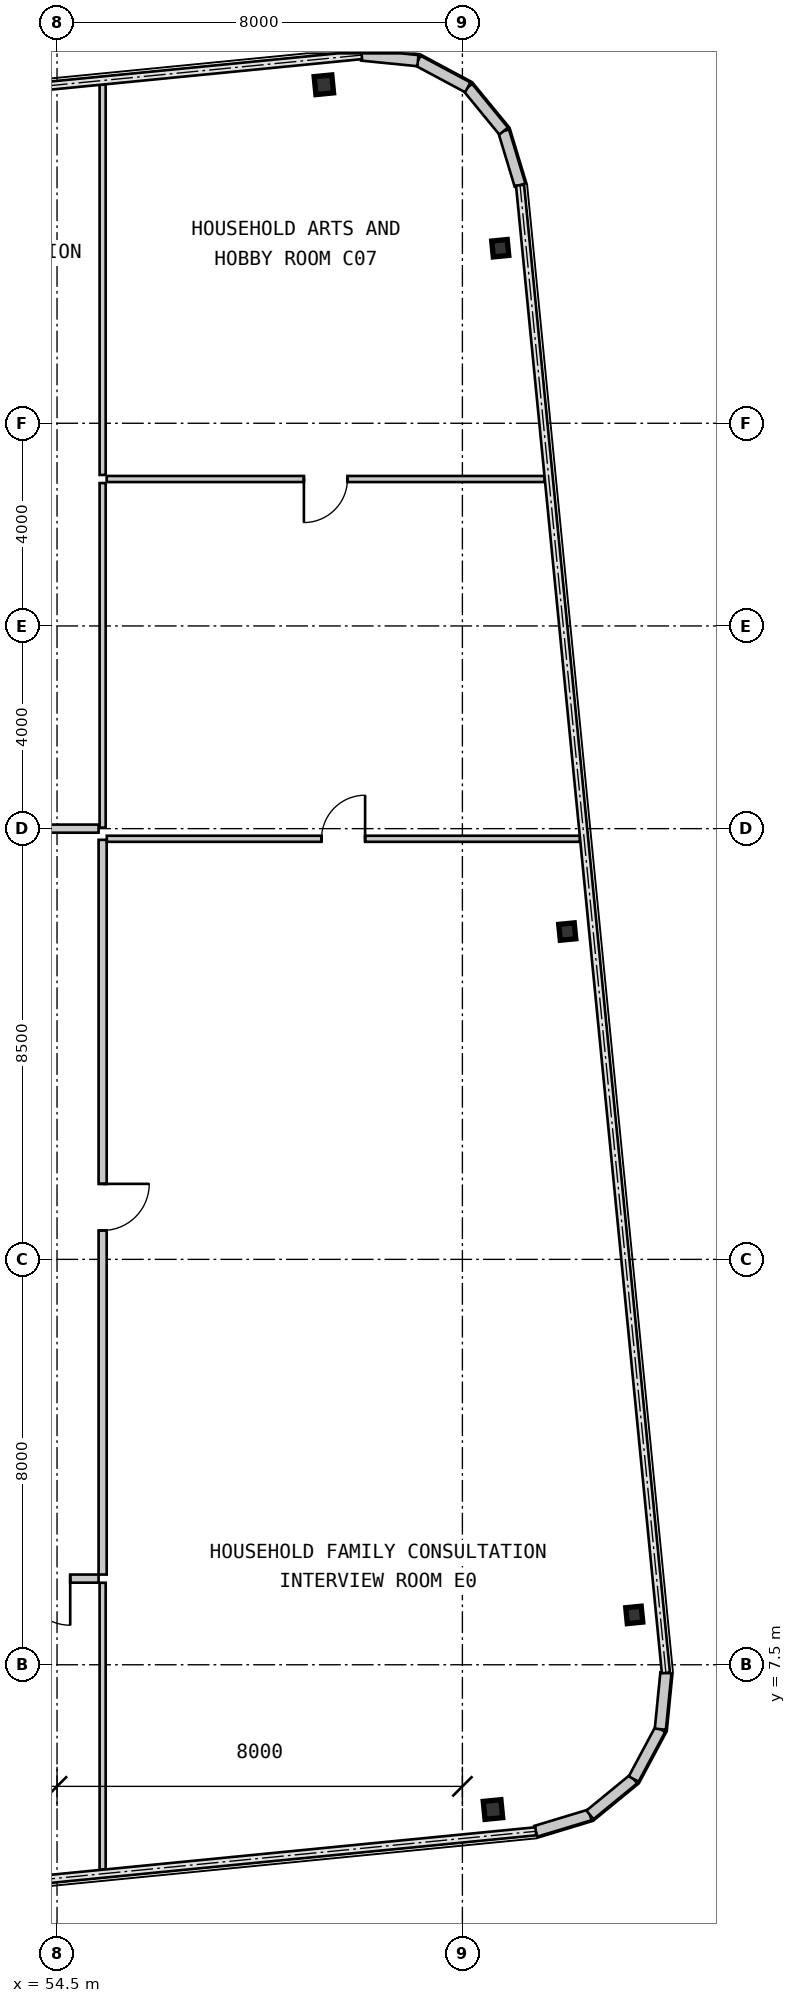
"""IFC4 building model, lengths in metres.
Left out: names, types, materials, properties, quantities, classifications, styles, units other than length and angle.
Written with IfcOpenShell. Run it as: python <this file> out.ifc"""

import sys

from ifc_helpers import new_model, si_unit, direction, frame, frame_2d, origin, origin_2d, place, context, subcontext, project, spatial, rectangle, i_section, extrude, source, transform, mapped, element, fill, save


model = new_model("IFC4")
c1 = context("Model", 3, precision=1e-05, world=origin(), true_north=direction((0.0, 1.0)))
c2 = subcontext(c1, "Body", "Model", "MODEL_VIEW")
j1 = project(units=[si_unit("LENGTHUNIT", "METRE"), si_unit("PLANEANGLEUNIT", "RADIAN")], contexts=[c1])
p1 = place(None, origin())
s1 = spatial("IfcSite", under=j1, at=p1, CompositionType="ELEMENT")
p2 = place(p1, origin())
s2 = spatial("IfcBuilding", under=s1, at=p2, CompositionType="ELEMENT")
p3 = place(p2, frame((0.0, 0.0, 106.05)))
s3 = spatial("IfcBuildingStorey", under=s2, at=p3, CompositionType="ELEMENT", Elevation=106.05)
m1 = source(origin(), c2, "Body", "SweptSolid", [
    extrude(i_section(OverallWidth=0.35, OverallDepth=0.356, WebThickness=0.018, FlangeThickness=0.028, at=origin_2d()), origin(), (0.0, 0.0, 1.0), 3.15),
])
for number, where, z_axis, x_axis in (
    (1, (63.103, 4.643, 0.0), (0.0, 0.0, 1.0), (0.995, 0.098, 0.0)),
    (2, (59.766, 38.68, 0.0), (0.0, 0.0, 1.0), (0.995, 0.098, 0.0)),
):
    element("IfcColumn", number, at=place(p3, frame(where, z_axis=z_axis, x_axis=x_axis)), inside=s3, PredefinedType="COLUMN", context=c2, shape_type="MappedRepresentation", body=[
        mapped(m1, transform((0.0, 0.0, 0.0), scale=1.0)),
    ])
m2 = source(origin(), c2, "Body", "SweptSolid", [
    extrude(i_section(OverallWidth=0.307, OverallDepth=0.315, WebThickness=0.012, FlangeThickness=0.019, at=origin_2d()), origin(), (0.0, 0.0, 1.0), 3.15),
])
for number, where, z_axis, x_axis in (
    (3, (65.892, 8.484, 0.0), (0.0, 0.0, 1.0), (0.995, 0.098, 0.0)),
    (4, (64.57, 21.969, 0.0), (0.0, 0.0, 1.0), (0.995, 0.098, 0.0)),
    (5, (63.247, 35.454, 0.0), (0.0, 0.0, 1.0), (0.995, 0.098, 0.0)),
):
    element("IfcColumn", number, at=place(p3, frame(where, z_axis=z_axis, x_axis=x_axis)), inside=s3, PredefinedType="COLUMN", context=c2, shape_type="MappedRepresentation", body=[
        mapped(m2, transform((0.0, 0.0, 0.0), scale=1.0)),
    ])
m3 = source(origin(), c2, "Body", "SweptSolid", [
    extrude(rectangle(XDim=1.116, YDim=0.22, at=frame_2d((0.558, 0.0))), origin(), (0.0, 0.0, 1.0), 2.93),
])
p4 = place(p3, frame((63.949, 4.214, 0.0), z_axis=(0.0, 0.0, 1.0), x_axis=(0.957052003726, 0.289916301997, 0.0)))
e6 = element("IfcWall", 6, at=p4, inside=s3, PredefinedType="SOLIDWALL", context=c2, shape_type="MappedRepresentation", body=[
    mapped(m3, transform((0.0, 0.0, 0.0), scale=1.0)),
])
m4 = source(origin(), c2, "Body", "SweptSolid", [
    extrude(rectangle(XDim=1.116, YDim=0.22, at=frame_2d((0.558, 0.0))), origin(), (0.0, 0.0, 1.0), 2.93),
])
p5 = place(p3, frame((65.017, 4.537, 0.0), z_axis=(0.0, 0.0, 1.0), x_axis=(0.773342870285, 0.633988016432, 0.0)))
e7 = element("IfcWall", 7, at=p5, inside=s3, PredefinedType="SOLIDWALL", context=c2, shape_type="MappedRepresentation", body=[
    mapped(m4, transform((0.0, 0.0, 0.0), scale=1.0)),
])
p6 = place(p3, frame((65.88, 5.245, 0.0), z_axis=(0.0, 0.0, 1.0), x_axis=(0.471723463201, 0.881746547635, 0.0)))
e8 = element("IfcWall", 8, at=p6, inside=s3, PredefinedType="SOLIDWALL", context=c2, shape_type="MappedRepresentation", body=[
    mapped(m3, transform((0.0, 0.0, 0.0), scale=1.0)),
])
for number, where, z_axis, x_axis in (
    (9, (66.406, 6.229, 0.0), (0.0, 0.0, 1.0), (0.098, 0.995, 0.0)),
    (10, (63.638, 36.698, 0.0), (0.0, 0.0, 1.0), (-0.29, 0.957, 0.0)),
):
    element("IfcWall", number, at=place(p3, frame(where, z_axis=z_axis, x_axis=x_axis)), inside=s3, PredefinedType="SOLIDWALL", context=c2, shape_type="MappedRepresentation", body=[
        mapped(m4, transform((0.0, 0.0, 0.0), scale=1.0)),
    ])
p7 = place(p3, frame((63.314, 37.766, 0.0), z_axis=(0.0, 0.0, 1.0), x_axis=(-0.634095287989, 0.773254916409, 0.0)))
e11 = element("IfcWall", 11, at=p7, inside=s3, PredefinedType="SOLIDWALL", context=c2, shape_type="MappedRepresentation", body=[
    mapped(m3, transform((0.0, 0.0, 0.0), scale=1.0)),
])
for number, where, z_axis, x_axis in (
    (12, (62.607, 38.629, 0.0), (0.0, 0.0, 1.0), (-0.882, 0.472, 0.0)),
    (13, (61.623, 39.156, 0.0), (0.0, 0.0, 1.0), (-0.995, 0.098, 0.0)),
):
    element("IfcWall", number, at=place(p3, frame(where, z_axis=z_axis, x_axis=x_axis)), inside=s3, PredefinedType="SOLIDWALL", context=c2, shape_type="MappedRepresentation", body=[
        mapped(m4, transform((0.0, 0.0, 0.0), scale=1.0)),
    ])
m5 = source(origin(), c2, "Body", "SweptSolid", [
    extrude(rectangle(XDim=2.04, YDim=0.16, at=frame_2d((1.02, 0.0))), origin(), (0.0, 0.0, 1.0), 2.93),
])
p8 = place(p3, frame((55.32, 9.2, 0.0), z_axis=(0.0, 0.0, 1.0), x_axis=(-1.0, 0.0, 0.0)))
e14 = element("IfcWall", 14, at=p8, inside=s3, PredefinedType="PARTITIONING", context=c2, shape_type="MappedRepresentation", body=[
    mapped(m5, transform((0.0, 0.0, 0.0), scale=1.0)),
])
m6 = source(origin(), c2, "Body", "SweptSolid", [
    extrude(rectangle(XDim=0.92, YDim=2.1, at=frame_2d((0.46, 1.05))), frame((0.0, 0.09, 0.0), z_axis=(0.0, -1.0, 0.0), x_axis=(1.0, 0.0, 0.0)), (0.0, 0.0, 1.0), 0.18),
])
p9 = place(p8, frame((0.56, 0.0, 0.0)))
e15 = element("IfcOpeningElement", 15, at=p9, cuts=e14, PredefinedType="OPENING", context=c2, shape_type="MappedRepresentation", body=[
    mapped(m6, transform((0.0, 0.0, 0.0), scale=1.0)),
])
m7 = source(origin(), c2, "Body", "SweptSolid", [
    extrude(rectangle(XDim=14.5, YDim=0.16, at=frame_2d((7.25, 0.0))), origin(), (0.0, 0.0, 1.0), 2.93),
])
p10 = place(p3, frame((55.4, 23.78, 0.0), z_axis=(0.0, 0.0, 1.0), x_axis=(0.0, -1.0, 0.0)))
e16 = element("IfcWall", 16, at=p10, inside=s3, PredefinedType="PARTITIONING", context=c2, shape_type="MappedRepresentation", body=[
    mapped(m7, transform((0.0, 0.0, 0.0), scale=1.0)),
])
p11 = place(p10, frame((6.79, 0.0, 0.0)))
e17 = element("IfcOpeningElement", 17, at=p11, cuts=e16, PredefinedType="OPENING", context=c2, shape_type="MappedRepresentation", body=[
    mapped(m6, transform((0.0, 0.0, 0.0), scale=1.0)),
])
m8 = source(origin(), c2, "Body", "SweptSolid", [
    extrude(rectangle(XDim=3.016, YDim=0.16, at=frame_2d((1.508, 0.0))), origin(), (0.0, 0.0, 1.0), 2.93),
])
p12 = place(p3, frame((52.304, 24.0, 0.0), z_axis=(0.0, 0.0, 1.0), x_axis=(1.0, 0.0, 0.0)))
e18 = element("IfcWall", 18, at=p12, inside=s3, PredefinedType="PARTITIONING", context=c2, shape_type="MappedRepresentation", body=[
    mapped(m8, transform((0.0, 0.0, 0.0), scale=1.0)),
])
m9 = source(origin(), c2, "Body", "SweptSolid", [
    extrude(rectangle(XDim=5.658, YDim=0.12, at=frame_2d((2.829, 0.0))), origin(), (0.0, 0.0, 1.0), 2.93),
])
p13 = place(p3, frame((55.4, 9.118, 0.0), z_axis=(0.0, 0.0, 1.0), x_axis=(0.0, -1.0, 0.0)))
e19 = element("IfcWall", 19, at=p13, inside=s3, PredefinedType="PARTITIONING", context=c2, shape_type="MappedRepresentation", body=[
    mapped(m9, transform((0.0, 0.0, 0.0), scale=1.0)),
])
m10 = source(origin(), c2, "Body", "SweptSolid", [
    extrude(rectangle(XDim=9.336, YDim=0.12, at=frame_2d((4.668, 0.0))), origin(), (0.0, 0.0, 1.0), 2.93),
])
p14 = place(p3, frame((55.482, 23.8, 0.0), z_axis=(0.0, 0.0, 1.0), x_axis=(1.0, 0.0, 0.0)))
e20 = element("IfcWall", 20, at=p14, inside=s3, PredefinedType="PARTITIONING", context=c2, shape_type="MappedRepresentation", body=[
    mapped(m10, transform((0.0, 0.0, 0.0), scale=1.0)),
])
m11 = source(origin(), c2, "Body", "SweptSolid", [
    extrude(rectangle(XDim=0.86, YDim=2.1, at=frame_2d((0.43, 1.05))), frame((0.0, 0.07, 0.0), z_axis=(0.0, -1.0, 0.0), x_axis=(1.0, 0.0, 0.0)), (0.0, 0.0, 1.0), 0.14),
])
p15 = place(p14, frame((4.238, 0.0, 0.0)))
e21 = element("IfcOpeningElement", 21, at=p15, cuts=e20, PredefinedType="OPENING", context=c2, shape_type="MappedRepresentation", body=[
    mapped(m11, transform((0.0, 0.0, 0.0), scale=1.0)),
])
m12 = source(origin(), c2, "Body", "SweptSolid", [
    extrude(rectangle(XDim=8.644, YDim=0.12, at=frame_2d((4.322, 0.0))), origin(), (0.0, 0.0, 1.0), 2.93),
])
p16 = place(p3, frame((55.48, 30.9, 0.0), z_axis=(0.0, 0.0, 1.0), x_axis=(1.0, 0.0, 0.0)))
e22 = element("IfcWall", 22, at=p16, inside=s3, PredefinedType="PARTITIONING", context=c2, shape_type="MappedRepresentation", body=[
    mapped(m12, transform((0.0, 0.0, 0.0), scale=1.0)),
])
p17 = place(p16, frame((3.892, 0.0, 0.0)))
e23 = element("IfcOpeningElement", 23, at=p17, cuts=e22, PredefinedType="OPENING", context=c2, shape_type="MappedRepresentation", body=[
    mapped(m11, transform((0.0, 0.0, 0.0), scale=1.0)),
])
m13 = source(origin(), c2, "Body", "SweptSolid", [
    extrude(rectangle(XDim=6.8, YDim=0.12, at=frame_2d((3.4, 0.0))), origin(), (0.0, 0.0, 1.0), 2.93),
])
p18 = place(p3, frame((55.4, 24.02, 0.0), z_axis=(0.0, 0.0, 1.0), x_axis=(0.0, 1.0, 0.0)))
e24 = element("IfcWall", 24, at=p18, inside=s3, PredefinedType="PARTITIONING", context=c2, shape_type="MappedRepresentation", body=[
    mapped(m13, transform((0.0, 0.0, 0.0), scale=1.0)),
])
m14 = source(origin(), c2, "Body", "SweptSolid", [
    extrude(rectangle(XDim=7.702, YDim=0.12, at=frame_2d((3.851, 0.0))), origin(), (0.0, 0.0, 1.0), 2.93),
])
p19 = place(p3, frame((55.4, 30.98, 0.0), z_axis=(0.0, 0.0, 1.0), x_axis=(0.0, 1.0, 0.0)))
e25 = element("IfcWall", 25, at=p19, inside=s3, PredefinedType="PARTITIONING", context=c2, shape_type="MappedRepresentation", body=[
    mapped(m14, transform((0.0, 0.0, 0.0), scale=1.0)),
])
m15 = source(origin(), c2, "Body", "SweptSolid", [
    extrude(rectangle(XDim=0.92, YDim=2.1, at=frame_2d((0.46, 1.05))), frame((0.0, 0.025, 0.0), z_axis=(0.0, -1.0, 0.0), x_axis=(1.0, 0.0, 0.0)), (0.0, 0.0, 1.0), 0.05),
])
p20 = place(p9, origin())
e26 = element("IfcDoor", 26, at=p20, inside=s3, OperationType="SINGLE_SWING_LEFT", PredefinedType="DOOR", context=c2, shape_type="MappedRepresentation", body=[
    mapped(m15, transform((0.0, 0.0, 0.0), scale=1.0)),
])
fill(e15, e26)
p21 = place(p11, origin())
e27 = element("IfcDoor", 27, at=p21, inside=s3, OperationType="SINGLE_SWING_LEFT", PredefinedType="DOOR", context=c2, shape_type="MappedRepresentation", body=[
    mapped(m15, transform((0.0, 0.0, 0.0), scale=1.0)),
])
fill(e17, e27)
m16 = source(origin(), c2, "Body", "SweptSolid", [
    extrude(rectangle(XDim=0.86, YDim=2.1, at=frame_2d((0.43, 1.05))), frame((0.0, 0.025, 0.0), z_axis=(0.0, -1.0, 0.0), x_axis=(1.0, 0.0, 0.0)), (0.0, 0.0, 1.0), 0.05),
])
p22 = place(p15, origin())
e28 = element("IfcDoor", 28, at=p22, inside=s3, OperationType="SINGLE_SWING_RIGHT", PredefinedType="DOOR", context=c2, shape_type="MappedRepresentation", body=[
    mapped(m16, transform((0.0, 0.0, 0.0), scale=1.0)),
])
fill(e21, e28)
p23 = place(p17, frame((0.86, 0.0, 0.0), z_axis=(0.0, 0.0, 1.0), x_axis=(-1.0, 0.0, 0.0)))
e29 = element("IfcDoor", 29, at=p23, inside=s3, OperationType="SINGLE_SWING_RIGHT", PredefinedType="DOOR", context=c2, shape_type="MappedRepresentation", body=[
    mapped(m16, transform((0.0, 0.0, 0.0), scale=1.0)),
])
fill(e23, e29)
save(model, sys.argv[1])
